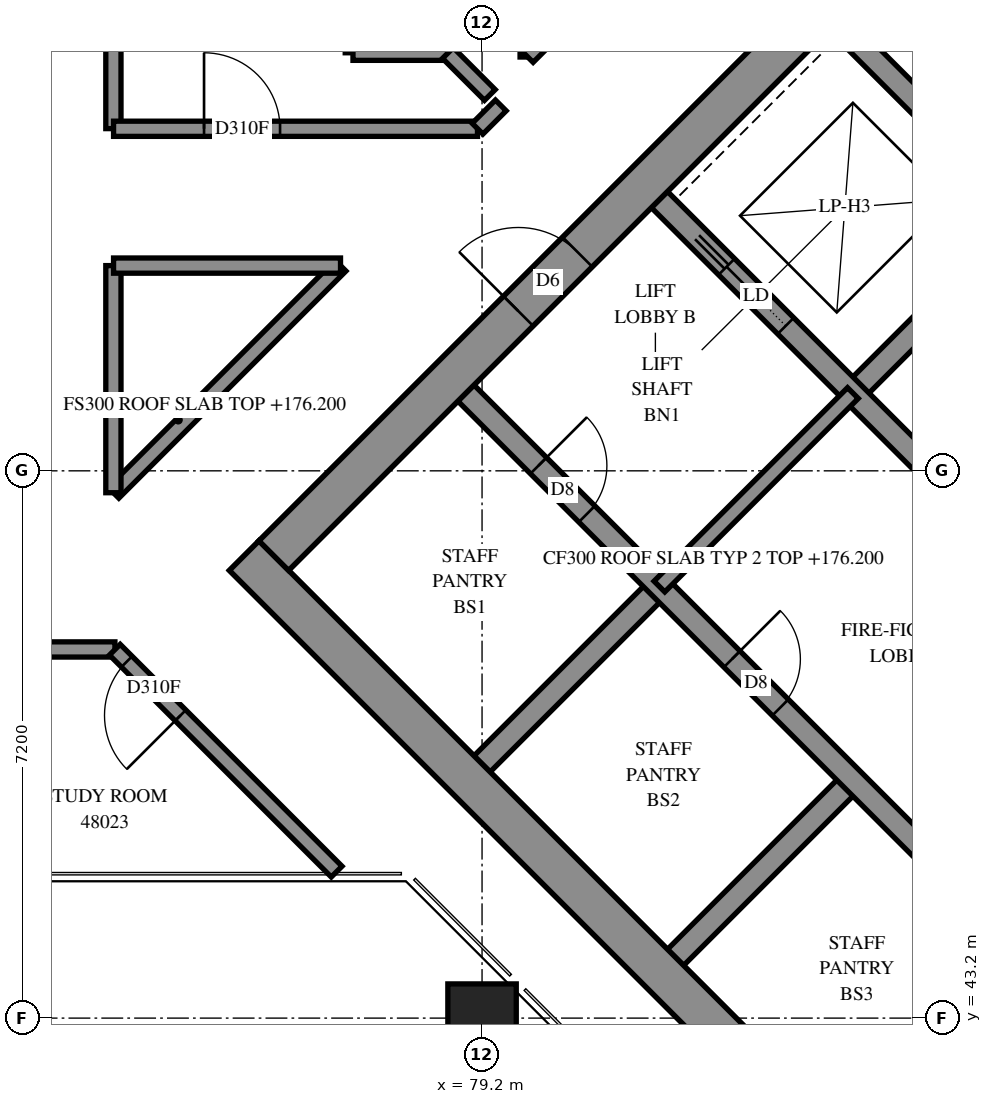
"""IFC4 building model, lengths in metres.
Left out: names, types, materials, properties, quantities, classifications, styles, units other than length and angle.
Written with IfcOpenShell. Run it as: python <this file> out.ifc"""

import sys

from ifc_helpers import new_model, si_unit, direction, frame, frame_2d, origin, origin_2d, place, context, subcontext, project, spatial, polyline, rectangle, outline, extrude, element, fill, save


model = new_model("IFC4")
c1 = context("Model", 3, precision=1e-05, world=origin(), true_north=direction((0.0, 1.0)))
c2 = subcontext(c1, "Body", "Model", "MODEL_VIEW")
j1 = project(units=[si_unit("LENGTHUNIT", "METRE"), si_unit("PLANEANGLEUNIT", "RADIAN")], contexts=[c1])
p1 = place(None, origin())
s1 = spatial("IfcSite", under=j1, at=p1, CompositionType="ELEMENT")
p2 = place(p1, origin())
s2 = spatial("IfcBuilding", under=s1, at=p2, CompositionType="ELEMENT")
p3 = place(p2, frame((0.0, 0.0, 176.2)))
s3 = spatial("IfcBuildingStorey", under=s2, at=p3, CompositionType="ELEMENT", Elevation=176.2)
p4 = place(p3, frame((79.2, 43.2, 0.0), z_axis=(0.0, 0.0, 1.0), x_axis=(1.0, 0.0, 0.0)))
e1 = element("IfcColumn", 1, at=p4, inside=s3, PredefinedType="COLUMN", context=c2, shape_type="SweptSolid", body=[
    extrude(rectangle(XDim=0.9, YDim=0.9, at=origin_2d()), origin(), (0.0, 0.0, 1.0), 3.9),
])
p5 = place(p3, frame((76.071, 49.284, -0.3), z_axis=(0.0, 0.0, 1.0), x_axis=(0.7071035554, -0.707110007, 0.0)))
e2 = element("IfcWall", 2, at=p5, inside=s3, PredefinedType="SHEAR", context=c2, shape_type="SweptSolid", body=[
    extrude(rectangle(XDim=15.5, YDim=0.55, at=frame_2d((7.75, 0.0))), origin(), (0.0, 0.0, 1.0), 3.5),
])
p6 = place(p3, frame((76.46, 49.284, -0.3), z_axis=(0.0, 0.0, 1.0), x_axis=(0.7071067812, 0.7071067812, 0.0)))
e3 = element("IfcWall", 3, at=p6, inside=s3, PredefinedType="SHEAR", context=c2, shape_type="SweptSolid", body=[
    extrude(rectangle(XDim=14.4, YDim=0.55, at=frame_2d((7.2, 0.0))), origin(), (0.0, 0.0, 1.0), 3.5),
])
p7 = place(p6, frame((4.55, 0.0, 0.3)))
e4 = element("IfcOpeningElement", 4, at=p7, cuts=e3, PredefinedType="OPENING", context=c2, shape_type="SweptSolid", body=[
    extrude(rectangle(XDim=1.1, YDim=2.1, at=frame_2d((0.55, 1.05))), frame((0.0, 0.285, 0.0), z_axis=(0.0, -1.0, 0.0), x_axis=(1.0, 0.0, 0.0)), (0.0, 0.0, 1.0), 0.57),
])
p8 = place(p6, frame((11.35, 0.0, 0.3)))
e5 = element("IfcOpeningElement", 5, at=p8, cuts=e3, PredefinedType="OPENING", context=c2, shape_type="SweptSolid", body=[
    extrude(rectangle(XDim=1.1, YDim=2.1, at=frame_2d((0.55, 1.05))), frame((0.0, 0.285, 0.0), z_axis=(0.0, -1.0, 0.0), x_axis=(1.0, 0.0, 0.0)), (0.0, 0.0, 1.0), 0.57),
])
for number, where, z_axis, x_axis in (
    (6, (79.2, 46.544, 0.0), (0.0, 0.0, 1.0), (0.707, 0.707, 0.0)),
    (7, (84.079, 51.423, 0.0), (0.0, 0.0, 1.0), (0.707, 0.707, 0.0)),
):
    element("IfcWall", number, at=place(p3, frame(where, z_axis=z_axis, x_axis=x_axis)), inside=s3, PredefinedType="SOLIDWALL", context=c2, shape_type="SweptSolid", body=[
        extrude(rectangle(XDim=3.3, YDim=0.3, at=frame_2d((1.65, 0.0))), origin(), (0.0, 0.0, 1.0), 3.9),
    ])
for number, where, z_axis, x_axis in (
    (8, (81.746, 43.999, 0.0), (0.0, 0.0, 1.0), (0.707, 0.707, 0.0)),
    (9, (84.291, 41.453, 0.0), (0.0, 0.0, 1.0), (0.707, 0.707, 0.0)),
):
    element("IfcWall", number, at=place(p3, frame(where, z_axis=z_axis, x_axis=x_axis)), inside=s3, PredefinedType="SOLIDWALL", context=c2, shape_type="SweptSolid", body=[
        extrude(rectangle(XDim=3.3, YDim=0.3, at=frame_2d((1.65, 0.0))), origin(), (0.0, 0.0, 1.0), 3.9),
    ])
p9 = place(p3, frame((78.988, 51.423, 0.0), z_axis=(0.0, 0.0, 1.0), x_axis=(0.7071067812, -0.7071067812, 0.0)))
e10 = element("IfcWall", 10, at=p9, inside=s3, PredefinedType="SOLIDWALL", context=c2, shape_type="SweptSolid", body=[
    extrude(rectangle(XDim=14.4, YDim=0.3, at=frame_2d((7.2, 0.0))), origin(), (0.0, 0.0, 1.0), 3.9),
])
p10 = place(p9, frame((1.35, 0.0, 0.0)))
e11 = element("IfcOpeningElement", 11, at=p10, cuts=e10, PredefinedType="OPENING", context=c2, shape_type="SweptSolid", body=[
    extrude(rectangle(XDim=0.9, YDim=2.1, at=frame_2d((0.45, 1.05))), frame((0.0, 0.16, 0.0), z_axis=(0.0, -1.0, 0.0), x_axis=(1.0, 0.0, 0.0)), (0.0, 0.0, 1.0), 0.32),
])
p11 = place(p9, frame((4.95, 0.0, 0.0)))
e12 = element("IfcOpeningElement", 12, at=p11, cuts=e10, PredefinedType="OPENING", context=c2, shape_type="SweptSolid", body=[
    extrude(rectangle(XDim=0.9, YDim=2.1, at=frame_2d((0.45, 1.05))), frame((0.0, 0.16, 0.0), z_axis=(0.0, -1.0, 0.0), x_axis=(1.0, 0.0, 0.0)), (0.0, 0.0, 1.0), 0.32),
])
p12 = place(p9, frame((8.55, 0.0, 0.0)))
e13 = element("IfcOpeningElement", 13, at=p12, cuts=e10, PredefinedType="OPENING", context=c2, shape_type="SweptSolid", body=[
    extrude(rectangle(XDim=0.9, YDim=2.1, at=frame_2d((0.45, 1.05))), frame((0.0, 0.16, 0.0), z_axis=(0.0, -1.0, 0.0), x_axis=(1.0, 0.0, 0.0)), (0.0, 0.0, 1.0), 0.32),
])
p13 = place(p9, frame((12.05, 0.0, 0.0)))
e14 = element("IfcOpeningElement", 14, at=p13, cuts=e10, PredefinedType="OPENING", context=c2, shape_type="SweptSolid", body=[
    extrude(rectangle(XDim=1.1, YDim=2.1, at=frame_2d((0.55, 1.05))), frame((0.0, 0.16, 0.0), z_axis=(0.0, -1.0, 0.0), x_axis=(1.0, 0.0, 0.0)), (0.0, 0.0, 1.0), 0.32),
])
p14 = place(p3, frame((81.534, 53.969, 0.0), z_axis=(0.0, 0.0, 1.0), x_axis=(0.707103309, -0.7071102534, 0.0)))
e15 = element("IfcWall", 15, at=p14, inside=s3, PredefinedType="SOLIDWALL", context=c2, shape_type="SweptSolid", body=[
    extrude(rectangle(XDim=14.4, YDim=0.3, at=frame_2d((7.2, 0.0))), origin(), (0.0, 0.0, 1.0), 3.9),
])
p15 = place(p14, frame((1.25, 0.0, 0.0)))
e16 = element("IfcOpeningElement", 16, at=p15, cuts=e15, PredefinedType="OPENING", context=c2, shape_type="SweptSolid", body=[
    extrude(rectangle(XDim=1.1, YDim=2.1, at=frame_2d((0.55, 1.05))), frame((0.0, 0.16, 0.0), z_axis=(0.0, -1.0, 0.0), x_axis=(1.0, 0.0, 0.0)), (0.0, 0.0, 1.0), 0.32),
])
p16 = place(p14, frame((4.85, 0.0, 0.0)))
e17 = element("IfcOpeningElement", 17, at=p16, cuts=e15, PredefinedType="OPENING", context=c2, shape_type="SweptSolid", body=[
    extrude(rectangle(XDim=1.1, YDim=2.1, at=frame_2d((0.55, 1.05))), frame((0.0, 0.16, 0.0), z_axis=(0.0, -1.0, 0.0), x_axis=(1.0, 0.0, 0.0)), (0.0, 0.0, 1.0), 0.32),
])
p17 = place(p14, frame((8.45, 0.0, 0.0)))
e18 = element("IfcOpeningElement", 18, at=p17, cuts=e15, PredefinedType="OPENING", context=c2, shape_type="SweptSolid", body=[
    extrude(rectangle(XDim=1.1, YDim=2.1, at=frame_2d((0.55, 1.05))), frame((0.0, 0.16, 0.0), z_axis=(0.0, -1.0, 0.0), x_axis=(1.0, 0.0, 0.0)), (0.0, 0.0, 1.0), 0.32),
])
p18 = place(p14, frame((12.05, 0.0, 0.0)))
e19 = element("IfcOpeningElement", 19, at=p18, cuts=e15, PredefinedType="OPENING", context=c2, shape_type="SweptSolid", body=[
    extrude(rectangle(XDim=1.1, YDim=2.1, at=frame_2d((0.55, 1.05))), frame((0.0, 0.16, 0.0), z_axis=(0.0, -1.0, 0.0), x_axis=(1.0, 0.0, 0.0)), (0.0, 0.0, 1.0), 0.32),
])
p19 = place(p3, frame((83.867, 56.302, 0.0), z_axis=(0.0, 0.0, 1.0), x_axis=(0.7071137256, -0.7070998367, 0.0)))
e20 = element("IfcWall", 20, at=p19, inside=s3, PredefinedType="SOLIDWALL", context=c2, shape_type="SweptSolid", body=[
    extrude(rectangle(XDim=7.2, YDim=0.3, at=frame_2d((3.6, 0.0))), origin(), (0.0, 0.0, 1.0), 3.9),
])
p20 = place(p3, frame((102.747, 49.938, 0.0), z_axis=(0.0, 0.0, 1.0), x_axis=(-0.7071083109, 0.7071052514, 0.0)))
e21 = element("IfcWall", 21, at=p20, inside=s3, PredefinedType="SOLIDWALL", context=c2, shape_type="SweptSolid", body=[
    extrude(outline(polyline([(-0.1, -0.1), (32.726, -0.1), (32.644, 0.1), (0.1, 0.1), (-0.1, -0.1)])), origin(), (0.0, 0.0, 1.0), 4.2),
])
p21 = place(p3, frame((81.534, 48.878, 0.0), z_axis=(0.0, 0.0, 1.0), x_axis=(0.707092892, 0.7071206701, 0.0)))
e22 = element("IfcWall", 22, at=p21, inside=s3, PredefinedType="PARTITIONING", context=c2, shape_type="SweptSolid", body=[
    extrude(rectangle(XDim=3.6, YDim=0.2, at=frame_2d((1.8, 0.0))), origin(), (0.0, 0.0, 1.0), 3.9),
])
p22 = place(p3, frame((55.25, 48.05, 0.0), z_axis=(0.0, 0.0, 1.0), x_axis=(1.0, 0.0, 0.0)))
e23 = element("IfcWall", 23, at=p22, inside=s3, PredefinedType="PARTITIONING", context=c2, shape_type="SweptSolid", body=[
    extrude(rectangle(XDim=19.12, YDim=0.2, at=frame_2d((9.56, 0.0))), origin(), (0.0, 0.0, 1.0), 3.9),
])
p23 = place(p22, frame((4.383, 0.0, 0.0)))
e24 = element("IfcOpeningElement", 24, at=p23, cuts=e23, PredefinedType="OPENING", context=c2, shape_type="SweptSolid", body=[
    extrude(rectangle(XDim=1.0, YDim=2.1, at=frame_2d((0.5, 1.05))), frame((0.0, 0.11, 0.0), z_axis=(0.0, -1.0, 0.0), x_axis=(1.0, 0.0, 0.0)), (0.0, 0.0, 1.0), 0.22),
])
p24 = place(p22, frame((6.457, 0.0, 0.0)))
e25 = element("IfcOpeningElement", 25, at=p24, cuts=e23, PredefinedType="OPENING", context=c2, shape_type="SweptSolid", body=[
    extrude(rectangle(XDim=1.0, YDim=2.1, at=frame_2d((0.5, 1.05))), frame((0.0, 0.11, 0.0), z_axis=(0.0, -1.0, 0.0), x_axis=(1.0, 0.0, 0.0)), (0.0, 0.0, 1.0), 0.22),
])
p25 = place(p22, frame((11.582, 0.0, 0.0)))
e26 = element("IfcOpeningElement", 26, at=p25, cuts=e23, PredefinedType="OPENING", context=c2, shape_type="SweptSolid", body=[
    extrude(rectangle(XDim=1.0, YDim=2.1, at=frame_2d((0.5, 1.05))), frame((0.0, 0.11, 0.0), z_axis=(0.0, -1.0, 0.0), x_axis=(1.0, 0.0, 0.0)), (0.0, 0.0, 1.0), 0.22),
])
p26 = place(p22, frame((13.658, 0.0, 0.0)))
e27 = element("IfcOpeningElement", 27, at=p26, cuts=e23, PredefinedType="OPENING", context=c2, shape_type="SweptSolid", body=[
    extrude(rectangle(XDim=1.0, YDim=2.1, at=frame_2d((0.5, 1.05))), frame((0.0, 0.11, 0.0), z_axis=(0.0, -1.0, 0.0), x_axis=(1.0, 0.0, 0.0)), (0.0, 0.0, 1.0), 0.22),
])
p27 = place(p3, frame((74.35, 54.902, 0.0), z_axis=(0.0, 0.0, 1.0), x_axis=(0.0, 1.0, 0.0)))
e28 = element("IfcWall", 28, at=p27, inside=s3, PredefinedType="PARTITIONING", context=c2, shape_type="SweptSolid", body=[
    extrude(rectangle(XDim=5.4, YDim=0.2, at=frame_2d((2.7, 0.0))), origin(), (0.0, 0.0, 1.0), 3.9),
])
p28 = place(p3, frame((74.352, 54.9, 0.0), z_axis=(0.0, 0.0, 1.0), x_axis=(1.0, 0.0, 0.0)))
e29 = element("IfcWall", 29, at=p28, inside=s3, PredefinedType="PARTITIONING", context=c2, shape_type="SweptSolid", body=[
    extrude(rectangle(XDim=4.788, YDim=0.2, at=frame_2d((2.394, 0.0))), origin(), (0.0, 0.0, 1.0), 3.9),
])
p29 = place(p28, frame((1.19, 0.0, 0.0)))
e30 = element("IfcOpeningElement", 30, at=p29, cuts=e29, PredefinedType="OPENING", context=c2, shape_type="SweptSolid", body=[
    extrude(rectangle(XDim=1.0, YDim=2.1, at=frame_2d((0.5, 1.05))), frame((0.0, 0.11, 0.0), z_axis=(0.0, -1.0, 0.0), x_axis=(1.0, 0.0, 0.0)), (0.0, 0.0, 1.0), 0.22),
])
p30 = place(p3, frame((74.351, 50.111, 0.0), z_axis=(0.0, 0.0, 1.0), x_axis=(0.7071067812, 0.7071067812, 0.0)))
e31 = element("IfcWall", 31, at=p30, inside=s3, PredefinedType="PARTITIONING", context=c2, shape_type="SweptSolid", body=[
    extrude(rectangle(XDim=4.226, YDim=0.2, at=frame_2d((2.113, 0.0))), origin(), (0.0, 0.0, 1.0), 3.9),
])
p31 = place(p3, frame((77.287, 45.127, 0.0), z_axis=(0.0, 0.0, 1.0), x_axis=(-0.7069614206, 0.7072521119, 0.0)))
e32 = element("IfcWall", 32, at=p31, inside=s3, PredefinedType="PARTITIONING", context=c2, shape_type="SweptSolid", body=[
    extrude(rectangle(XDim=4.128, YDim=0.2, at=frame_2d((2.064, 0.0))), origin(), (0.0, 0.0, 1.0), 3.9),
])
p32 = place(p31, frame((2.906, 0.0, 0.0)))
e33 = element("IfcOpeningElement", 33, at=p32, cuts=e32, PredefinedType="OPENING", context=c2, shape_type="SweptSolid", body=[
    extrude(rectangle(XDim=1.0, YDim=2.1, at=frame_2d((0.5, 1.05))), frame((0.0, 0.11, 0.0), z_axis=(0.0, -1.0, 0.0), x_axis=(1.0, 0.0, 0.0)), (0.0, 0.0, 1.0), 0.22),
])
p33 = place(p3, frame((79.8, 55.844, 0.0), z_axis=(0.0, 0.0, 1.0), x_axis=(0.0, 1.0, 0.0)))
e34 = element("IfcWall", 34, at=p33, inside=s3, PredefinedType="PARTITIONING", context=c2, shape_type="SweptSolid", body=[
    extrude(rectangle(XDim=3.456, YDim=0.2, at=frame_2d((1.728, 0.0))), origin(), (0.0, 0.0, 1.0), 3.9),
])
p34 = place(p3, frame((74.35, 50.112, 0.0), z_axis=(0.0, 0.0, 1.0), x_axis=(0.0, 1.0, 0.0)))
e35 = element("IfcWall", 35, at=p34, inside=s3, PredefinedType="PARTITIONING", context=c2, shape_type="SweptSolid", body=[
    extrude(rectangle(XDim=2.988, YDim=0.2, at=frame_2d((1.494, 0.0))), origin(), (0.0, 0.0, 1.0), 3.9),
])
p35 = place(p3, frame((74.352, 53.1, 0.0), z_axis=(0.0, 0.0, 1.0), x_axis=(1.0, 0.0, 0.0)))
e36 = element("IfcWall", 36, at=p35, inside=s3, PredefinedType="PARTITIONING", context=c2, shape_type="SweptSolid", body=[
    extrude(rectangle(XDim=2.986, YDim=0.2, at=frame_2d((1.493, 0.0))), origin(), (0.0, 0.0, 1.0), 3.9),
])
p36 = place(p3, frame((79.801, 55.845, 0.0), z_axis=(0.0, 0.0, 1.0), x_axis=(0.7071067812, 0.7071067812, 0.0)))
e37 = element("IfcWall", 37, at=p36, inside=s3, PredefinedType="PARTITIONING", context=c2, shape_type="SweptSolid", body=[
    extrude(rectangle(XDim=1.553, YDim=0.2, at=frame_2d((0.776, 0.0))), origin(), (0.0, 0.0, 1.0), 3.9),
])
p37 = place(p3, frame((77.502, 55.9, 0.0), z_axis=(0.0, 0.0, 1.0), x_axis=(1.0, 0.0, 0.0)))
e38 = element("IfcWall", 38, at=p37, inside=s3, PredefinedType="PARTITIONING", context=c2, shape_type="SweptSolid", body=[
    extrude(rectangle(XDim=1.252, YDim=0.2, at=frame_2d((0.626, 0.0))), origin(), (0.0, 0.0, 1.0), 3.9),
])
p38 = place(p3, frame((78.751, 55.897, 0.0), z_axis=(0.0, 0.0, 1.0), x_axis=(0.7071067812, -0.7071067812, 0.0)))
e39 = element("IfcWall", 39, at=p38, inside=s3, PredefinedType="PARTITIONING", context=c2, shape_type="SweptSolid", body=[
    extrude(rectangle(XDim=0.781, YDim=0.2, at=frame_2d((0.39, 0.0))), origin(), (0.0, 0.0, 1.0), 3.9),
])
p39 = place(p3, frame((79.141, 54.901, 0.0), z_axis=(0.0, 0.0, 1.0), x_axis=(0.7071067812, 0.7071067812, 0.0)))
e40 = element("IfcWall", 40, at=p39, inside=s3, PredefinedType="PARTITIONING", context=c2, shape_type="SweptSolid", body=[
    extrude(rectangle(XDim=0.433, YDim=0.2, at=frame_2d((0.216, 0.0))), origin(), (0.0, 0.0, 1.0), 3.9),
])
p40 = place(p7, origin())
e41 = element("IfcDoor", 41, at=p40, inside=s3, OperationType="DOUBLE_DOOR_SINGLE_SWING", PredefinedType="DOOR", context=c2, shape_type="SweptSolid", body=[
    extrude(rectangle(XDim=1.1, YDim=2.1, at=frame_2d((0.55, 1.05))), frame((0.0, 0.025, 0.0), z_axis=(0.0, -1.0, 0.0), x_axis=(1.0, 0.0, 0.0)), (0.0, 0.0, 1.0), 0.05),
])
fill(e4, e41)
p41 = place(p10, origin())
e42 = element("IfcDoor", 42, at=p41, inside=s3, OperationType="SINGLE_SWING_LEFT", PredefinedType="DOOR", context=c2, shape_type="SweptSolid", body=[
    extrude(rectangle(XDim=0.9, YDim=2.1, at=frame_2d((0.45, 1.05))), frame((0.0, 0.025, 0.0), z_axis=(0.0, -1.0, 0.0), x_axis=(1.0, 0.0, 0.0)), (0.0, 0.0, 1.0), 0.05),
])
fill(e11, e42)
p42 = place(p11, origin())
e43 = element("IfcDoor", 43, at=p42, inside=s3, OperationType="SINGLE_SWING_LEFT", PredefinedType="DOOR", context=c2, shape_type="SweptSolid", body=[
    extrude(rectangle(XDim=0.9, YDim=2.1, at=frame_2d((0.45, 1.05))), frame((0.0, 0.025, 0.0), z_axis=(0.0, -1.0, 0.0), x_axis=(1.0, 0.0, 0.0)), (0.0, 0.0, 1.0), 0.05),
])
fill(e12, e43)
p43 = place(p15, origin())
e44 = element("IfcDoor", 44, at=p43, inside=s3, OperationType="SLIDING_TO_LEFT", PredefinedType="DOOR", context=c2, shape_type="SweptSolid", body=[
    extrude(rectangle(XDim=1.1, YDim=2.1, at=frame_2d((0.55, 1.05))), frame((0.0, 0.025, 0.0), z_axis=(0.0, -1.0, 0.0), x_axis=(1.0, 0.0, 0.0)), (0.0, 0.0, 1.0), 0.05),
])
fill(e16, e44)
p44 = place(p29, origin())
e45 = element("IfcDoor", 45, at=p44, inside=s3, OperationType="SINGLE_SWING_LEFT", PredefinedType="DOOR", context=c2, shape_type="SweptSolid", body=[
    extrude(rectangle(XDim=1.0, YDim=2.1, at=frame_2d((0.5, 1.05))), frame((0.0, 0.025, 0.0), z_axis=(0.0, -1.0, 0.0), x_axis=(1.0, 0.0, 0.0)), (0.0, 0.0, 1.0), 0.05),
])
fill(e30, e45)
p45 = place(p32, origin())
e46 = element("IfcDoor", 46, at=p45, inside=s3, OperationType="SINGLE_SWING_LEFT", PredefinedType="DOOR", context=c2, shape_type="SweptSolid", body=[
    extrude(rectangle(XDim=1.0, YDim=2.1, at=frame_2d((0.5, 1.05))), frame((0.0, 0.025, 0.0), z_axis=(0.0, -1.0, 0.0), x_axis=(1.0, 0.0, 0.0)), (0.0, 0.0, 1.0), 0.05),
])
fill(e33, e46)
save(model, sys.argv[1])
